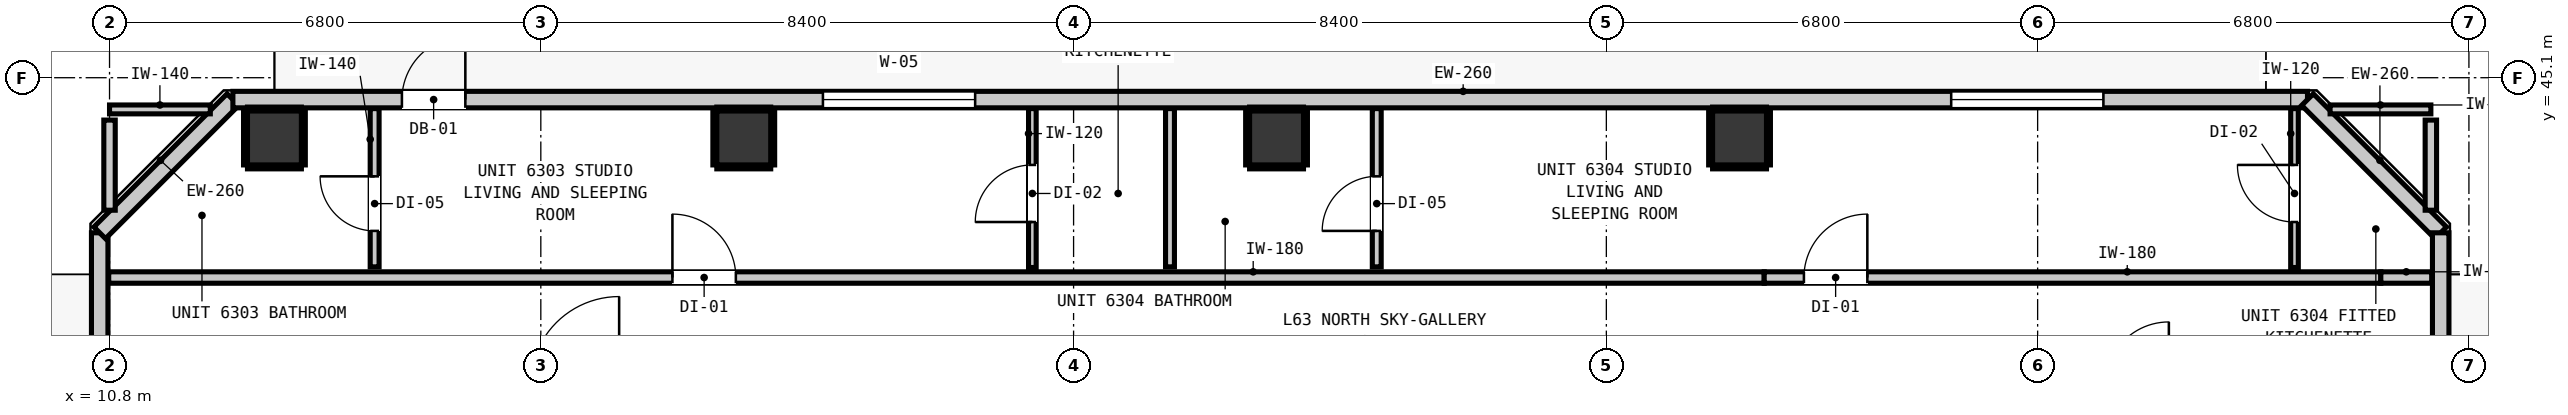
"""IFC4 building model, lengths in metres.
Left out: names, types, materials, properties, quantities, classifications, styles, units other than length and angle.
Written with IfcOpenShell. Run it as: python <this file> out.ifc"""

import sys

from ifc_helpers import new_model, si_unit, direction, frame, frame_2d, origin, origin_2d, place, context, subcontext, project, spatial, rectangle, extrude, element, fill, save


model = new_model("IFC4")
c1 = context("Model", 3, precision=1e-05, world=origin(), true_north=direction((0.0, 1.0)))
c2 = subcontext(c1, "Body", "Model", "MODEL_VIEW")
j1 = project(units=[si_unit("LENGTHUNIT", "METRE"), si_unit("PLANEANGLEUNIT", "RADIAN")], contexts=[c1])
p1 = place(None, origin())
s1 = spatial("IfcSite", under=j1, at=p1, CompositionType="ELEMENT")
p2 = place(p1, origin())
s2 = spatial("IfcBuilding", under=s1, at=p2, CompositionType="ELEMENT")
p3 = place(p2, frame((0.0, 0.0, 216.72)))
s3 = spatial("IfcBuildingStorey", under=s2, at=p3, CompositionType="ELEMENT", Elevation=216.72)
for number, where, z_axis, x_axis in (
    (1, (13.4, 44.15, 0.0), (0.0, 0.0, 1.0), (1.0, 0.0, 0.0)),
    (2, (20.8, 44.15, 0.0), (0.0, 0.0, 1.0), (1.0, 0.0, 0.0)),
    (3, (29.2, 44.15, 0.0), (0.0, 0.0, 1.0), (1.0, 0.0, 0.0)),
    (4, (36.5, 44.15, 0.0), (0.0, 0.0, 1.0), (1.0, 0.0, 0.0)),
):
    element("IfcColumn", number, at=place(p3, frame(where, z_axis=z_axis, x_axis=x_axis)), inside=s3, PredefinedType="COLUMN", context=c2, shape_type="SweptSolid", body=[
        extrude(rectangle(XDim=0.85, YDim=0.85, at=origin_2d()), origin(), (0.0, 0.0, 1.0), 3.32),
    ])
p4 = place(p3, frame((10.645, 12.345, 0.0), z_axis=(0.0, 0.0, 1.0), x_axis=(0.0, 1.0, 0.0)))
e5 = element("IfcWall", 5, at=p4, inside=s3, PredefinedType="STANDARD", context=c2, shape_type="SweptSolid", body=[
    extrude(rectangle(XDim=30.31, YDim=0.26, at=frame_2d((15.155, 0.0))), origin(), (0.0, 0.0, 1.0), 3.1),
])
p5 = place(p4, frame((0.91, 0.0, 0.0)))
e6 = element("IfcOpeningElement", 6, at=p5, cuts=e5, PredefinedType="OPENING", context=c2, shape_type="SweptSolid", body=[
    extrude(rectangle(XDim=1.0, YDim=2.15, at=frame_2d((0.5, 1.075))), frame((0.0, 0.14, 0.0), z_axis=(0.0, -1.0, 0.0), x_axis=(1.0, 0.0, 0.0)), (0.0, 0.0, 1.0), 0.28),
])
p6 = place(p4, frame((2.322, 0.0, 0.85)))
e7 = element("IfcOpeningElement", 7, at=p6, cuts=e5, PredefinedType="OPENING", context=c2, shape_type="SweptSolid", body=[
    extrude(rectangle(XDim=0.58, YDim=1.5, at=frame_2d((0.29, 0.75))), frame((0.0, 0.14, 0.0), z_axis=(0.0, -1.0, 0.0), x_axis=(1.0, 0.0, 0.0)), (0.0, 0.0, 1.0), 0.28),
])
p7 = place(p3, frame((10.645, 42.655, 0.0), z_axis=(0.0, 0.0, 1.0), x_axis=(0.707147883682, 0.707065676302, 0.0)))
e8 = element("IfcWall", 8, at=p7, inside=s3, PredefinedType="STANDARD", context=c2, shape_type="SweptSolid", body=[
    extrude(rectangle(XDim=2.97, YDim=0.26, at=frame_2d((1.485, 0.0))), origin(), (0.0, 0.0, 1.0), 3.1),
])
p8 = place(p3, frame((12.745, 44.755, 0.0), z_axis=(0.0, 0.0, 1.0), x_axis=(1.0, 0.0, 0.0)))
e9 = element("IfcWall", 9, at=p8, inside=s3, PredefinedType="STANDARD", context=c2, shape_type="SweptSolid", body=[
    extrude(rectangle(XDim=32.71, YDim=0.26, at=frame_2d((16.355, 0.0))), origin(), (0.0, 0.0, 1.0), 3.1),
])
p9 = place(p8, frame((2.665, 0.0, 0.0)))
e10 = element("IfcOpeningElement", 10, at=p9, cuts=e9, PredefinedType="OPENING", context=c2, shape_type="SweptSolid", body=[
    extrude(rectangle(XDim=1.0, YDim=2.15, at=frame_2d((0.5, 1.075))), frame((0.0, 0.14, 0.0), z_axis=(0.0, -1.0, 0.0), x_axis=(1.0, 0.0, 0.0)), (0.0, 0.0, 1.0), 0.28),
])
p10 = place(p8, frame((9.303, 0.0, 0.85)))
e11 = element("IfcOpeningElement", 11, at=p10, cuts=e9, PredefinedType="OPENING", context=c2, shape_type="SweptSolid", body=[
    extrude(rectangle(XDim=2.4, YDim=1.95, at=frame_2d((1.2, 0.975))), frame((0.0, 0.14, 0.0), z_axis=(0.0, -1.0, 0.0), x_axis=(1.0, 0.0, 0.0)), (0.0, 0.0, 1.0), 0.28),
])
p11 = place(p8, frame((27.092, 0.0, 0.85)))
e12 = element("IfcOpeningElement", 12, at=p11, cuts=e9, PredefinedType="OPENING", context=c2, shape_type="SweptSolid", body=[
    extrude(rectangle(XDim=2.4, YDim=1.95, at=frame_2d((1.2, 0.975))), frame((0.0, 0.14, 0.0), z_axis=(0.0, -1.0, 0.0), x_axis=(1.0, 0.0, 0.0)), (0.0, 0.0, 1.0), 0.28),
])
p12 = place(p3, frame((45.455, 44.755, 0.0), z_axis=(0.0, 0.0, 1.0), x_axis=(0.707106781187, -0.707106781187, 0.0)))
e13 = element("IfcWall", 13, at=p12, inside=s3, PredefinedType="STANDARD", context=c2, shape_type="SweptSolid", body=[
    extrude(rectangle(XDim=2.97, YDim=0.26, at=frame_2d((1.485, 0.0))), origin(), (0.0, 0.0, 1.0), 3.1),
])
p13 = place(p3, frame((47.555, 42.655, 0.0), z_axis=(0.0, 0.0, 1.0), x_axis=(0.0, -1.0, 0.0)))
e14 = element("IfcWall", 14, at=p13, inside=s3, PredefinedType="STANDARD", context=c2, shape_type="SweptSolid", body=[
    extrude(rectangle(XDim=30.31, YDim=0.26, at=frame_2d((15.155, 0.0))), origin(), (0.0, 0.0, 1.0), 3.1),
])
p14 = place(p13, frame((4.082, 0.0, 0.0)))
e15 = element("IfcOpeningElement", 15, at=p14, cuts=e14, PredefinedType="OPENING", context=c2, shape_type="SweptSolid", body=[
    extrude(rectangle(XDim=1.0, YDim=2.15, at=frame_2d((0.5, 1.075))), frame((0.0, 0.14, 0.0), z_axis=(0.0, -1.0, 0.0), x_axis=(1.0, 0.0, 0.0)), (0.0, 0.0, 1.0), 0.28),
])
p15 = place(p13, frame((23.951, 0.0, 0.85)))
e16 = element("IfcOpeningElement", 16, at=p15, cuts=e14, PredefinedType="OPENING", context=c2, shape_type="SweptSolid", body=[
    extrude(rectangle(XDim=2.4, YDim=1.95, at=frame_2d((1.2, 0.975))), frame((0.0, 0.14, 0.0), z_axis=(0.0, -1.0, 0.0), x_axis=(1.0, 0.0, 0.0)), (0.0, 0.0, 1.0), 0.28),
])
p16 = place(p13, frame((27.508, 0.0, 0.85)))
e17 = element("IfcOpeningElement", 17, at=p16, cuts=e14, PredefinedType="OPENING", context=c2, shape_type="SweptSolid", body=[
    extrude(rectangle(XDim=2.4, YDim=1.95, at=frame_2d((1.2, 0.975))), frame((0.0, 0.14, 0.0), z_axis=(0.0, -1.0, 0.0), x_axis=(1.0, 0.0, 0.0)), (0.0, 0.0, 1.0), 0.28),
])
p17 = place(p13, frame((15.105, 0.0, 0.85)))
e18 = element("IfcOpeningElement", 18, at=p17, cuts=e14, PredefinedType="OPENING", context=c2, shape_type="SweptSolid", body=[
    extrude(rectangle(XDim=2.4, YDim=1.95, at=frame_2d((1.2, 0.975))), frame((0.0, 0.14, 0.0), z_axis=(0.0, -1.0, 0.0), x_axis=(1.0, 0.0, 0.0)), (0.0, 0.0, 1.0), 0.28),
])
p18 = place(p3, frame((10.787, 41.95, 0.0), z_axis=(0.0, 0.0, 1.0), x_axis=(1.0, 0.0, 0.0)))
e19 = element("IfcWall", 19, at=p18, inside=s3, PredefinedType="PARTITIONING", context=c2, shape_type="SweptSolid", body=[
    extrude(rectangle(XDim=26.102, YDim=0.18, at=frame_2d((13.051, 0.0))), origin(), (0.0, 0.0, 1.0), 3.1),
])
p19 = place(p18, frame((8.888, 0.0, 0.0)))
e20 = element("IfcOpeningElement", 20, at=p19, cuts=e19, PredefinedType="OPENING", context=c2, shape_type="SweptSolid", body=[
    extrude(rectangle(XDim=1.0, YDim=2.15, at=frame_2d((0.5, 1.075))), frame((0.0, 0.1, 0.0), z_axis=(0.0, -1.0, 0.0), x_axis=(1.0, 0.0, 0.0)), (0.0, 0.0, 1.0), 0.2),
])
p20 = place(p3, frame((36.889, 41.95, 0.0), z_axis=(0.0, 0.0, 1.0), x_axis=(1.0, 0.0, 0.0)))
e21 = element("IfcWall", 21, at=p20, inside=s3, PredefinedType="PARTITIONING", context=c2, shape_type="SweptSolid", body=[
    extrude(rectangle(XDim=9.722, YDim=0.18, at=frame_2d((4.861, 0.0))), origin(), (0.0, 0.0, 1.0), 2.477),
])
p21 = place(p20, frame((0.626, 0.0, 0.0)))
e22 = element("IfcOpeningElement", 22, at=p21, cuts=e21, PredefinedType="OPENING", context=c2, shape_type="SweptSolid", body=[
    extrude(rectangle(XDim=1.0, YDim=2.15, at=frame_2d((0.5, 1.075))), frame((0.0, 0.1, 0.0), z_axis=(0.0, -1.0, 0.0), x_axis=(1.0, 0.0, 0.0)), (0.0, 0.0, 1.0), 0.2),
])
p22 = place(p3, frame((46.611, 41.95, 0.0), z_axis=(0.0, 0.0, 1.0), x_axis=(1.0, 0.0, 0.0)))
e23 = element("IfcWall", 23, at=p22, inside=s3, PredefinedType="PARTITIONING", context=c2, shape_type="SweptSolid", body=[
    extrude(rectangle(XDim=0.802, YDim=0.18, at=frame_2d((0.401, 0.0))), origin(), (0.0, 0.0, 1.0), 3.1),
])
for number, where, z_axis, x_axis in (
    (24, (10.8, 44.6, 0.0), (0.0, 0.0, 1.0), (1.0, 0.0, 0.0)),
    (25, (45.811, 44.6, 0.0), (0.0, 0.0, 1.0), (1.0, 0.0, 0.0)),
):
    element("IfcWall", number, at=place(p3, frame(where, z_axis=z_axis, x_axis=x_axis)), inside=s3, PredefinedType="PARTITIONING", context=c2, shape_type="SweptSolid", body=[
        extrude(rectangle(XDim=1.589, YDim=0.14, at=frame_2d((0.794, 0.0))), origin(), (0.0, 0.0, 1.0), 3.1),
    ])
for number, where, z_axis, x_axis in (
    (26, (10.8, 43.011, 0.0), (0.0, 0.0, 1.0), (0.0, 1.0, 0.0)),
    (27, (47.4, 43.011, 0.0), (0.0, 0.0, 1.0), (0.0, 1.0, 0.0)),
):
    element("IfcWall", number, at=place(p3, frame(where, z_axis=z_axis, x_axis=x_axis)), inside=s3, PredefinedType="PARTITIONING", context=c2, shape_type="SweptSolid", body=[
        extrude(rectangle(XDim=1.421, YDim=0.18, at=frame_2d((0.71, 0.0))), origin(), (0.0, 0.0, 1.0), 3.1),
    ])
p23 = place(p3, frame((14.98, 42.118, 0.0), z_axis=(0.0, 0.0, 1.0), x_axis=(0.0, 1.0, 0.0)))
e28 = element("IfcWall", 28, at=p23, inside=s3, PredefinedType="PARTITIONING", context=c2, shape_type="SweptSolid", body=[
    extrude(rectangle(XDim=2.495, YDim=0.14, at=frame_2d((1.248, 0.0))), origin(), (0.0, 0.0, 1.0), 3.1),
])
p24 = place(p23, frame((0.567, 0.0, 0.0)))
e29 = element("IfcOpeningElement", 29, at=p24, cuts=e28, PredefinedType="OPENING", context=c2, shape_type="SweptSolid", body=[
    extrude(rectangle(XDim=0.86, YDim=2.02, at=frame_2d((0.43, 1.01))), frame((0.0, 0.08, 0.0), z_axis=(0.0, -1.0, 0.0), x_axis=(1.0, 0.0, 0.0)), (0.0, 0.0, 1.0), 0.16),
])
p25 = place(p3, frame((27.52, 42.118, 0.0), z_axis=(0.0, 0.0, 1.0), x_axis=(0.0, 1.0, 0.0)))
e30 = element("IfcWall", 30, at=p25, inside=s3, PredefinedType="PARTITIONING", context=c2, shape_type="SweptSolid", body=[
    extrude(rectangle(XDim=2.495, YDim=0.14, at=frame_2d((1.248, 0.0))), origin(), (0.0, 0.0, 1.0), 3.1),
])
p26 = place(p3, frame((30.78, 42.118, 0.0), z_axis=(0.0, 0.0, 1.0), x_axis=(0.0, 1.0, 0.0)))
e31 = element("IfcWall", 31, at=p26, inside=s3, PredefinedType="PARTITIONING", context=c2, shape_type="SweptSolid", body=[
    extrude(rectangle(XDim=2.495, YDim=0.14, at=frame_2d((1.248, 0.0))), origin(), (0.0, 0.0, 1.0), 3.1),
])
p27 = place(p26, frame((0.567, 0.0, 0.0)))
e32 = element("IfcOpeningElement", 32, at=p27, cuts=e31, PredefinedType="OPENING", context=c2, shape_type="SweptSolid", body=[
    extrude(rectangle(XDim=0.86, YDim=2.02, at=frame_2d((0.43, 1.01))), frame((0.0, 0.08, 0.0), z_axis=(0.0, -1.0, 0.0), x_axis=(1.0, 0.0, 0.0)), (0.0, 0.0, 1.0), 0.16),
])
p28 = place(p3, frame((25.35, 42.108, 0.0), z_axis=(0.0, 0.0, 1.0), x_axis=(0.0, 1.0, 0.0)))
e33 = element("IfcWall", 33, at=p28, inside=s3, PredefinedType="PARTITIONING", context=c2, shape_type="SweptSolid", body=[
    extrude(rectangle(XDim=2.505, YDim=0.12, at=frame_2d((1.252, 0.0))), origin(), (0.0, 0.0, 1.0), 3.1),
])
p29 = place(p28, frame((0.717, 0.0, 0.0)))
e34 = element("IfcOpeningElement", 34, at=p29, cuts=e33, PredefinedType="OPENING", context=c2, shape_type="SweptSolid", body=[
    extrude(rectangle(XDim=0.9, YDim=2.1, at=frame_2d((0.45, 1.05))), frame((0.0, 0.07, 0.0), z_axis=(0.0, -1.0, 0.0), x_axis=(1.0, 0.0, 0.0)), (0.0, 0.0, 1.0), 0.14),
])
p30 = place(p3, frame((45.25, 42.108, 0.0), z_axis=(0.0, 0.0, 1.0), x_axis=(0.0, 1.0, 0.0)))
e35 = element("IfcWall", 35, at=p30, inside=s3, PredefinedType="PARTITIONING", context=c2, shape_type="SweptSolid", body=[
    extrude(rectangle(XDim=2.505, YDim=0.12, at=frame_2d((1.252, 0.0))), origin(), (0.0, 0.0, 1.0), 3.1),
])
p31 = place(p30, frame((0.717, 0.0, 0.0)))
e36 = element("IfcOpeningElement", 36, at=p31, cuts=e35, PredefinedType="OPENING", context=c2, shape_type="SweptSolid", body=[
    extrude(rectangle(XDim=0.9, YDim=2.1, at=frame_2d((0.45, 1.05))), frame((0.0, 0.07, 0.0), z_axis=(0.0, -1.0, 0.0), x_axis=(1.0, 0.0, 0.0)), (0.0, 0.0, 1.0), 0.14),
])
for number, where, z_axis, x_axis in (
    (37, (12.975, 43.693, 0.0), (0.0, 0.0, 1.0), (1.0, 0.0, 0.0)),
    (38, (12.975, 44.607, 0.0), (0.0, 0.0, 1.0), (1.0, 0.0, 0.0)),
    (39, (12.943, 43.725, 0.0), (0.0, 0.0, 1.0), (0.0, 1.0, 0.0)),
    (40, (13.857, 43.725, 0.0), (0.0, 0.0, 1.0), (0.0, 1.0, 0.0)),
):
    element("IfcWall", number, at=place(p3, frame(where, z_axis=z_axis, x_axis=x_axis)), inside=s3, PredefinedType="PARTITIONING", context=c2, shape_type="SweptSolid", body=[
        extrude(rectangle(XDim=0.85, YDim=0.06, at=frame_2d((0.425, 0.0))), origin(), (0.0, 0.0, 1.0), 1.45),
    ])
for number, where, z_axis, x_axis in (
    (41, (20.375, 43.693, 0.0), (0.0, 0.0, 1.0), (1.0, 0.0, 0.0)),
    (42, (20.375, 44.607, 0.0), (0.0, 0.0, 1.0), (1.0, 0.0, 0.0)),
):
    element("IfcWall", number, at=place(p3, frame(where, z_axis=z_axis, x_axis=x_axis)), inside=s3, PredefinedType="PARTITIONING", context=c2, shape_type="SweptSolid", body=[
        extrude(rectangle(XDim=0.85, YDim=0.06, at=frame_2d((0.425, 0.0))), origin(), (0.0, 0.0, 1.0), 1.45),
    ])
for number, where, z_axis, x_axis in (
    (43, (20.343, 43.725, 0.0), (0.0, 0.0, 1.0), (0.0, 1.0, 0.0)),
    (44, (21.257, 43.725, 0.0), (0.0, 0.0, 1.0), (0.0, 1.0, 0.0)),
):
    element("IfcWall", number, at=place(p3, frame(where, z_axis=z_axis, x_axis=x_axis)), inside=s3, PredefinedType="PARTITIONING", context=c2, shape_type="SweptSolid", body=[
        extrude(rectangle(XDim=0.85, YDim=0.06, at=frame_2d((0.425, 0.0))), origin(), (0.0, 0.0, 1.0), 1.45),
    ])
for number, where, z_axis, x_axis in (
    (45, (28.775, 43.693, 0.0), (0.0, 0.0, 1.0), (1.0, 0.0, 0.0)),
    (46, (28.775, 44.607, 0.0), (0.0, 0.0, 1.0), (1.0, 0.0, 0.0)),
):
    element("IfcWall", number, at=place(p3, frame(where, z_axis=z_axis, x_axis=x_axis)), inside=s3, PredefinedType="PARTITIONING", context=c2, shape_type="SweptSolid", body=[
        extrude(rectangle(XDim=0.85, YDim=0.06, at=frame_2d((0.425, 0.0))), origin(), (0.0, 0.0, 1.0), 1.45),
    ])
for number, where, z_axis, x_axis in (
    (47, (28.743, 43.725, 0.0), (0.0, 0.0, 1.0), (0.0, 1.0, 0.0)),
    (48, (29.657, 43.725, 0.0), (0.0, 0.0, 1.0), (0.0, 1.0, 0.0)),
):
    element("IfcWall", number, at=place(p3, frame(where, z_axis=z_axis, x_axis=x_axis)), inside=s3, PredefinedType="PARTITIONING", context=c2, shape_type="SweptSolid", body=[
        extrude(rectangle(XDim=0.85, YDim=0.06, at=frame_2d((0.425, 0.0))), origin(), (0.0, 0.0, 1.0), 1.45),
    ])
for number, where, z_axis, x_axis in (
    (49, (36.075, 43.693, 0.0), (0.0, 0.0, 1.0), (1.0, 0.0, 0.0)),
    (50, (36.075, 44.607, 0.0), (0.0, 0.0, 1.0), (1.0, 0.0, 0.0)),
):
    element("IfcWall", number, at=place(p3, frame(where, z_axis=z_axis, x_axis=x_axis)), inside=s3, PredefinedType="PARTITIONING", context=c2, shape_type="SweptSolid", body=[
        extrude(rectangle(XDim=0.85, YDim=0.06, at=frame_2d((0.425, 0.0))), origin(), (0.0, 0.0, 1.0), 1.45),
    ])
for number, where, z_axis, x_axis in (
    (51, (36.043, 43.725, 0.0), (0.0, 0.0, 1.0), (0.0, 1.0, 0.0)),
    (52, (36.957, 43.725, 0.0), (0.0, 0.0, 1.0), (0.0, 1.0, 0.0)),
):
    element("IfcWall", number, at=place(p3, frame(where, z_axis=z_axis, x_axis=x_axis)), inside=s3, PredefinedType="PARTITIONING", context=c2, shape_type="SweptSolid", body=[
        extrude(rectangle(XDim=0.85, YDim=0.06, at=frame_2d((0.425, 0.0))), origin(), (0.0, 0.0, 1.0), 1.45),
    ])
p32 = place(p9, origin())
e53 = element("IfcDoor", 53, at=p32, inside=s3, OperationType="SINGLE_SWING_RIGHT", PredefinedType="DOOR", context=c2, shape_type="SweptSolid", body=[
    extrude(rectangle(XDim=1.0, YDim=2.15, at=frame_2d((0.5, 1.075))), frame((0.0, 0.025, 0.0), z_axis=(0.0, -1.0, 0.0), x_axis=(1.0, 0.0, 0.0)), (0.0, 0.0, 1.0), 0.05),
])
fill(e10, e53)
p33 = place(p10, origin())
e54 = element("IfcWindow", 54, at=p33, inside=s3, PartitioningType="SINGLE_PANEL", PredefinedType="WINDOW", context=c2, shape_type="SweptSolid", body=[
    extrude(rectangle(XDim=2.4, YDim=1.95, at=frame_2d((1.2, 0.975))), frame((0.0, 0.03, 0.0), z_axis=(0.0, -1.0, 0.0), x_axis=(1.0, 0.0, 0.0)), (0.0, 0.0, 1.0), 0.06),
])
fill(e11, e54)
p34 = place(p11, origin())
e55 = element("IfcWindow", 55, at=p34, inside=s3, PartitioningType="SINGLE_PANEL", PredefinedType="WINDOW", context=c2, shape_type="SweptSolid", body=[
    extrude(rectangle(XDim=2.4, YDim=1.95, at=frame_2d((1.2, 0.975))), frame((0.0, 0.03, 0.0), z_axis=(0.0, -1.0, 0.0), x_axis=(1.0, 0.0, 0.0)), (0.0, 0.0, 1.0), 0.06),
])
fill(e12, e55)
p35 = place(p19, origin())
e56 = element("IfcDoor", 56, at=p35, inside=s3, OperationType="SINGLE_SWING_LEFT", PredefinedType="DOOR", context=c2, shape_type="SweptSolid", body=[
    extrude(rectangle(XDim=1.0, YDim=2.15, at=frame_2d((0.5, 1.075))), frame((0.0, 0.025, 0.0), z_axis=(0.0, -1.0, 0.0), x_axis=(1.0, 0.0, 0.0)), (0.0, 0.0, 1.0), 0.05),
])
fill(e20, e56)
p36 = place(p24, origin())
e57 = element("IfcDoor", 57, at=p36, inside=s3, OperationType="SINGLE_SWING_RIGHT", PredefinedType="DOOR", context=c2, shape_type="SweptSolid", body=[
    extrude(rectangle(XDim=0.86, YDim=2.02, at=frame_2d((0.43, 1.01))), frame((0.0, 0.025, 0.0), z_axis=(0.0, -1.0, 0.0), x_axis=(1.0, 0.0, 0.0)), (0.0, 0.0, 1.0), 0.05),
])
fill(e29, e57)
p37 = place(p29, origin())
e58 = element("IfcDoor", 58, at=p37, inside=s3, OperationType="SINGLE_SWING_LEFT", PredefinedType="DOOR", context=c2, shape_type="SweptSolid", body=[
    extrude(rectangle(XDim=0.9, YDim=2.1, at=frame_2d((0.45, 1.05))), frame((0.0, 0.025, 0.0), z_axis=(0.0, -1.0, 0.0), x_axis=(1.0, 0.0, 0.0)), (0.0, 0.0, 1.0), 0.05),
])
fill(e34, e58)
p38 = place(p21, origin())
e59 = element("IfcDoor", 59, at=p38, inside=s3, OperationType="SINGLE_SWING_RIGHT", PredefinedType="DOOR", context=c2, shape_type="SweptSolid", body=[
    extrude(rectangle(XDim=1.0, YDim=2.15, at=frame_2d((0.5, 1.075))), frame((0.0, 0.025, 0.0), z_axis=(0.0, -1.0, 0.0), x_axis=(1.0, 0.0, 0.0)), (0.0, 0.0, 1.0), 0.05),
])
fill(e22, e59)
p39 = place(p27, origin())
e60 = element("IfcDoor", 60, at=p39, inside=s3, OperationType="SINGLE_SWING_LEFT", PredefinedType="DOOR", context=c2, shape_type="SweptSolid", body=[
    extrude(rectangle(XDim=0.86, YDim=2.02, at=frame_2d((0.43, 1.01))), frame((0.0, 0.025, 0.0), z_axis=(0.0, -1.0, 0.0), x_axis=(1.0, 0.0, 0.0)), (0.0, 0.0, 1.0), 0.05),
])
fill(e32, e60)
p40 = place(p31, origin())
e61 = element("IfcDoor", 61, at=p40, inside=s3, OperationType="SINGLE_SWING_RIGHT", PredefinedType="DOOR", context=c2, shape_type="SweptSolid", body=[
    extrude(rectangle(XDim=0.9, YDim=2.1, at=frame_2d((0.45, 1.05))), frame((0.0, 0.025, 0.0), z_axis=(0.0, -1.0, 0.0), x_axis=(1.0, 0.0, 0.0)), (0.0, 0.0, 1.0), 0.05),
])
fill(e36, e61)
save(model, sys.argv[1])
